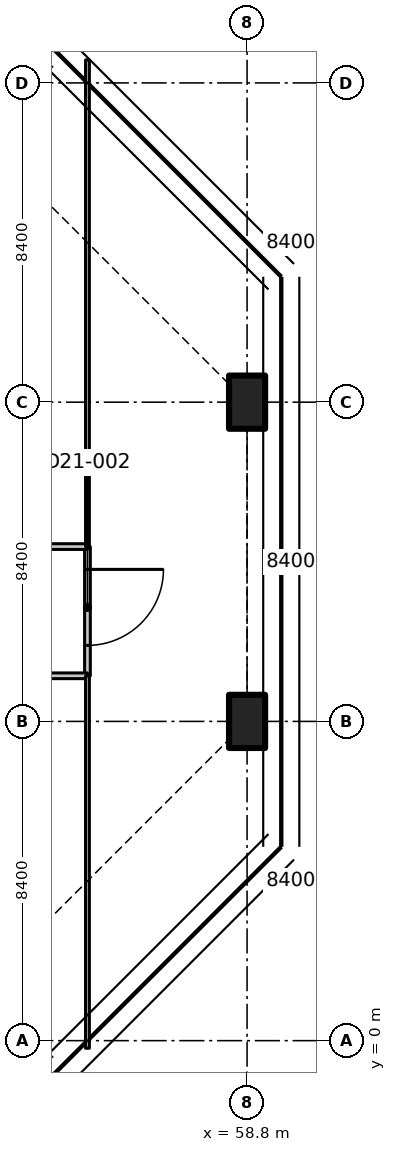
"""IFC4 building model, lengths in metres.
Left out: names, types, materials, properties, quantities, classifications, styles, units other than length and angle.
Written with IfcOpenShell. Run it as: python <this file> out.ifc"""

import sys

from ifc_helpers import new_model, si_unit, direction, frame, frame_2d, origin, origin_2d, place, context, subcontext, project, spatial, polyline, rectangle, outline, extrude, element, fill, save


model = new_model("IFC4")
c1 = context("Model", 3, precision=1e-05, world=origin(), true_north=direction((0.0, 1.0)))
c2 = subcontext(c1, "Body", "Model", "MODEL_VIEW")
j1 = project(units=[si_unit("LENGTHUNIT", "METRE"), si_unit("PLANEANGLEUNIT", "RADIAN")], contexts=[c1])
p1 = place(None, origin())
s1 = spatial("IfcSite", under=j1, at=p1, CompositionType="ELEMENT")
p2 = place(p1, origin())
s2 = spatial("IfcBuilding", under=s1, at=p2, CompositionType="ELEMENT")
p3 = place(p2, frame((0.0, 0.0, 166.8)))
s3 = spatial("IfcBuildingStorey", under=s2, at=p3, CompositionType="ELEMENT", Elevation=166.8)
for number, where, z_axis, x_axis in (
    (1, (58.8, 8.4, 0.0), (0.0, 0.0, 1.0), (1.0, 0.0, 0.0)),
    (2, (58.8, 16.8, 0.0), (0.0, 0.0, 1.0), (1.0, 0.0, 0.0)),
):
    element("IfcColumn", number, at=place(p3, frame(where, z_axis=z_axis, x_axis=x_axis)), inside=s3, PredefinedType="COLUMN", context=c2, shape_type="SweptSolid", body=[
        extrude(rectangle(XDim=0.95, YDim=1.4, at=origin_2d()), origin(), (0.0, 0.0, 1.0), 3.35),
    ])
p4 = place(p3, frame((54.6, 13.0, 0.0), z_axis=(0.0, 0.0, 1.0), x_axis=(0.0, -1.0, 0.0)))
e3 = element("IfcWall", 3, at=p4, inside=s3, PredefinedType="PARTITIONING", context=c2, shape_type="SweptSolid", body=[
    extrude(rectangle(XDim=3.4, YDim=0.15, at=frame_2d((1.7, 0.0))), origin(), (0.0, 0.0, 1.0), 3.33),
])
p5 = place(p4, frame((0.6, 0.0, 0.0)))
e4 = element("IfcOpeningElement", 4, at=p5, cuts=e3, PredefinedType="OPENING", context=c2, shape_type="SweptSolid", body=[
    extrude(rectangle(XDim=2.0, YDim=2.4, at=frame_2d((1.0, 1.2))), frame((0.0, 0.085, 0.0), z_axis=(0.0, -1.0, 0.0), x_axis=(1.0, 0.0, 0.0)), (0.0, 0.0, 1.0), 0.17),
])
p6 = place(p3, frame((54.6, 9.6, 0.0), z_axis=(0.0, 0.0, 1.0), x_axis=(-1.0, 0.0, 0.0)))
e5 = element("IfcWall", 5, at=p6, inside=s3, PredefinedType="PARTITIONING", context=c2, shape_type="SweptSolid", body=[
    extrude(rectangle(XDim=8.4, YDim=0.15, at=frame_2d((4.2, 0.0))), origin(), (0.0, 0.0, 1.0), 3.33),
])
p7 = place(p6, frame((4.8, 0.0, 0.0)))
e6 = element("IfcOpeningElement", 6, at=p7, cuts=e5, PredefinedType="OPENING", context=c2, shape_type="SweptSolid", body=[
    extrude(rectangle(XDim=1.6, YDim=2.1, at=frame_2d((0.8, 1.05))), frame((0.0, 0.085, 0.0), z_axis=(0.0, -1.0, 0.0), x_axis=(1.0, 0.0, 0.0)), (0.0, 0.0, 1.0), 0.17),
])
p8 = place(p3, frame((50.4, 13.0, 0.0), z_axis=(0.0, 0.0, 1.0), x_axis=(1.0, 0.0, 0.0)))
e7 = element("IfcWall", 7, at=p8, inside=s3, PredefinedType="PARTITIONING", context=c2, shape_type="SweptSolid", body=[
    extrude(rectangle(XDim=4.2, YDim=0.15, at=frame_2d((2.1, 0.0))), origin(), (0.0, 0.0, 1.0), 3.33),
])
p9 = place(p8, frame((1.5, 0.0, 0.0)))
e8 = element("IfcOpeningElement", 8, at=p9, cuts=e7, PredefinedType="OPENING", context=c2, shape_type="SweptSolid", body=[
    extrude(rectangle(XDim=1.1, YDim=2.1, at=frame_2d((0.55, 1.05))), frame((0.0, 0.085, 0.0), z_axis=(0.0, -1.0, 0.0), x_axis=(1.0, 0.0, 0.0)), (0.0, 0.0, 1.0), 0.17),
])
p10 = place(p3, frame((54.6, -0.2, 0.0), z_axis=(0.0, 0.0, 1.0), x_axis=(0.0, 1.0, 0.0)))
e9 = element("IfcWall", 9, at=p10, inside=s3, PredefinedType="PARTITIONING", context=c2, shape_type="SweptSolid", body=[
    extrude(outline(polyline([(0.0, 0.0), (9.8, 0.0), (9.8, 3.33), (5.066, 3.33), (5.064, 2.98), (3.736, 2.98), (3.734, 3.33), (0.0, 3.33), (0.0, 0.0)])), frame((0.0, 0.05, 0.0), z_axis=(0.0, -1.0, 0.0), x_axis=(1.0, 0.0, 0.0)), (0.0, 0.0, 1.0), 0.1),
])
p11 = place(p3, frame((54.6, 13.0, 0.0), z_axis=(0.0, 0.0, 1.0), x_axis=(0.0, 1.0, 0.0)))
e10 = element("IfcWall", 10, at=p11, inside=s3, PredefinedType="PARTITIONING", context=c2, shape_type="SweptSolid", body=[
    extrude(outline(polyline([(0.0, 0.0), (12.805, 0.0), (12.805, 3.33), (12.4, 3.33), (8.666, 3.33), (8.664, 2.98), (7.336, 2.98), (7.334, 3.33), (0.0, 3.33), (0.0, 0.0)])), frame((0.0, 0.05, 0.0), z_axis=(0.0, -1.0, 0.0), x_axis=(1.0, 0.0, 0.0)), (0.0, 0.0, 1.0), 0.1),
])
p12 = place(p5, origin())
e11 = element("IfcDoor", 11, at=p12, inside=s3, OperationType="DOUBLE_DOOR_SINGLE_SWING", PredefinedType="DOOR", context=c2, shape_type="SweptSolid", body=[
    extrude(rectangle(XDim=2.0, YDim=2.4, at=frame_2d((1.0, 1.2))), frame((0.0, 0.025, 0.0), z_axis=(0.0, -1.0, 0.0), x_axis=(1.0, 0.0, 0.0)), (0.0, 0.0, 1.0), 0.05),
])
fill(e4, e11)
save(model, sys.argv[1])
